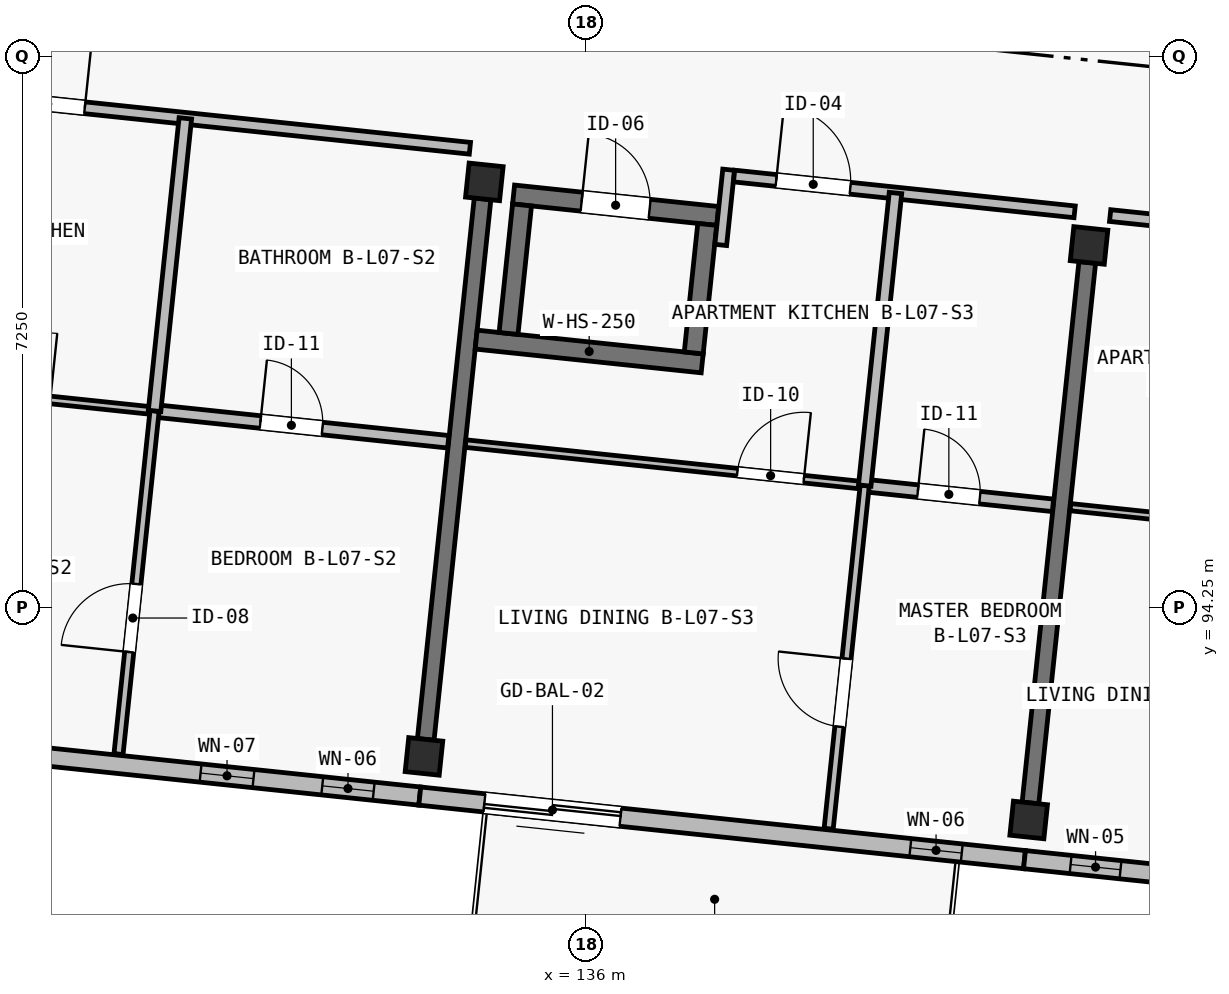
"""IFC4 building model, lengths in metres.
Left out: names, types, materials, properties, quantities, classifications, styles, units other than length and angle.
Written with IfcOpenShell. Run it as: python <this file> out.ifc"""

import sys

from ifc_helpers import new_model, si_unit, direction, frame, frame_2d, origin, origin_2d, place, context, subcontext, project, spatial, rectangle, extrude, element, fill, save


model = new_model("IFC4")
c1 = context("Model", 3, precision=1e-05, world=origin(), true_north=direction((0.0, 1.0)))
c2 = subcontext(c1, "Body", "Model", "MODEL_VIEW")
j1 = project(units=[si_unit("LENGTHUNIT", "METRE"), si_unit("PLANEANGLEUNIT", "RADIAN")], contexts=[c1])
p1 = place(None, origin())
s1 = spatial("IfcSite", under=j1, at=p1, CompositionType="ELEMENT")
p2 = place(p1, origin())
s2 = spatial("IfcBuilding", under=s1, at=p2, CompositionType="ELEMENT")
p3 = place(p2, frame((0.0, 0.0, 24.65)))
s3 = spatial("IfcBuildingStorey", under=s2, at=p3, CompositionType="ELEMENT", Elevation=24.65)
for number, where, z_axis, x_axis in (
    (1, (133.868, 92.291, 0.0), (0.0, 0.0, 1.0), (0.995, -0.105, 0.0)),
    (2, (134.663, 99.85, 0.0), (0.0, 0.0, 1.0), (0.995, -0.105, 0.0)),
    (3, (141.825, 91.455, 0.0), (0.0, 0.0, 1.0), (0.995, -0.105, 0.0)),
    (4, (142.619, 99.013, 0.0), (0.0, 0.0, 1.0), (0.995, -0.105, 0.0)),
):
    element("IfcColumn", number, at=place(p3, frame(where, z_axis=z_axis, x_axis=x_axis)), inside=s3, PredefinedType="COLUMN", context=c2, shape_type="SweptSolid", body=[
        extrude(rectangle(XDim=0.45, YDim=0.45, at=origin_2d()), origin(), (0.0, 0.0, 1.0), 3.25),
    ])
p4 = place(p3, frame((133.892, 92.515, 0.0), z_axis=(0.0, 0.0, 1.0), x_axis=(0.104519481265, 0.994522839374, 0.0)))
e5 = element("IfcWall", 5, at=p4, inside=s3, PredefinedType="SHEAR", context=c2, shape_type="SweptSolid", body=[
    extrude(rectangle(XDim=7.15, YDim=0.22, at=frame_2d((3.575, 0.0))), origin(), (0.0, 0.0, 1.0), 2.5),
])
p5 = place(p3, frame((141.848, 91.679, 0.0), z_axis=(0.0, 0.0, 1.0), x_axis=(0.104553253602, 0.994519289487, 0.0)))
e6 = element("IfcWall", 6, at=p5, inside=s3, PredefinedType="SHEAR", context=c2, shape_type="SweptSolid", body=[
    extrude(rectangle(XDim=7.15, YDim=0.22, at=frame_2d((3.575, 0.0))), origin(), (0.0, 0.0, 1.0), 2.5),
])
p6 = place(p3, frame((134.555, 97.775, 0.0), z_axis=(0.0, 0.0, 1.0), x_axis=(0.994514844427, -0.104595526741, 0.0)))
e7 = element("IfcWall", 7, at=p6, inside=s3, PredefinedType="SHEAR", context=c2, shape_type="SweptSolid", body=[
    extrude(rectangle(XDim=2.99, YDim=0.25, at=frame_2d((1.495, 0.0))), origin(), (0.0, 0.0, 1.0), 3.25),
])
p7 = place(p3, frame((135.048, 99.684, 0.0), z_axis=(0.0, 0.0, 1.0), x_axis=(0.994522285292, -0.104524753323, 0.0)))
e8 = element("IfcWall", 8, at=p7, inside=s3, PredefinedType="SHEAR", context=c2, shape_type="SweptSolid", body=[
    extrude(rectangle(XDim=2.7, YDim=0.25, at=frame_2d((1.35, 0.0))), origin(), (0.0, 0.0, 1.0), 3.25),
])
p8 = place(p7, frame((0.9, 0.0, 0.0)))
e9 = element("IfcOpeningElement", 9, at=p8, cuts=e8, PredefinedType="OPENING", context=c2, shape_type="SweptSolid", body=[
    extrude(rectangle(XDim=0.9, YDim=2.05, at=frame_2d((0.45, 1.025))), frame((0.0, 0.14, 0.0), z_axis=(0.0, -1.0, 0.0), x_axis=(1.0, 0.0, 0.0)), (0.0, 0.0, 1.0), 0.28),
])
for number, where, z_axis, x_axis in (
    (10, (134.981, 97.855, 0.0), (0.0, 0.0, 1.0), (0.105, 0.995, 0.0)),
    (11, (137.418, 97.599, 0.0), (0.0, 0.0, 1.0), (0.105, 0.995, 0.0)),
):
    element("IfcWall", number, at=place(p3, frame(where, z_axis=z_axis, x_axis=x_axis)), inside=s3, PredefinedType="SHEAR", context=c2, shape_type="SweptSolid", body=[
        extrude(rectangle(XDim=1.7, YDim=0.25, at=frame_2d((0.85, 0.0))), origin(), (0.0, 0.0, 1.0), 3.25),
    ])
p9 = place(p3, frame((133.814, 91.769, 0.0), z_axis=(0.0, 0.0, 1.0), x_axis=(-0.994522662826, 0.104521161134, 0.0)))
e12 = element("IfcWall", 12, at=p9, inside=s3, PredefinedType="SOLIDWALL", context=c2, shape_type="SweptSolid", body=[
    extrude(rectangle(XDim=8.0, YDim=0.24, at=frame_2d((4.0, 0.0))), origin(), (0.0, 0.0, 1.0), 3.0),
])
p10 = place(p9, frame((0.61, 0.0, 0.42)))
e13 = element("IfcOpeningElement", 13, at=p10, cuts=e12, PredefinedType="OPENING", context=c2, shape_type="SweptSolid", body=[
    extrude(rectangle(XDim=0.68, YDim=2.24, at=frame_2d((0.34, 1.12))), frame((0.0, 0.135, 0.0), z_axis=(0.0, -1.0, 0.0), x_axis=(1.0, 0.0, 0.0)), (0.0, 0.0, 1.0), 0.27),
])
p11 = place(p9, frame((2.2, 0.0, 0.48)))
e14 = element("IfcOpeningElement", 14, at=p11, cuts=e12, PredefinedType="OPENING", context=c2, shape_type="SweptSolid", body=[
    extrude(rectangle(XDim=0.7, YDim=2.36, at=frame_2d((0.35, 1.18))), frame((0.0, 0.135, 0.0), z_axis=(0.0, -1.0, 0.0), x_axis=(1.0, 0.0, 0.0)), (0.0, 0.0, 1.0), 0.27),
])
p12 = place(p9, frame((5.341, 0.0, 0.42)))
e15 = element("IfcOpeningElement", 15, at=p12, cuts=e12, PredefinedType="OPENING", context=c2, shape_type="SweptSolid", body=[
    extrude(rectangle(XDim=0.74, YDim=2.26, at=frame_2d((0.37, 1.13))), frame((0.0, 0.135, 0.0), z_axis=(0.0, -1.0, 0.0), x_axis=(1.0, 0.0, 0.0)), (0.0, 0.0, 1.0), 0.27),
])
p13 = place(p3, frame((141.77, 90.933, 0.0), z_axis=(0.0, 0.0, 1.0), x_axis=(-0.994519156568, 0.104554517933, 0.0)))
e16 = element("IfcWall", 16, at=p13, inside=s3, PredefinedType="SOLIDWALL", context=c2, shape_type="SweptSolid", body=[
    extrude(rectangle(XDim=8.0, YDim=0.24, at=frame_2d((4.0, 0.0))), origin(), (0.0, 0.0, 1.0), 3.0),
])
p14 = place(p13, frame((5.345, 0.0, 0.0)))
e17 = element("IfcOpeningElement", 17, at=p14, cuts=e16, PredefinedType="OPENING", context=c2, shape_type="SweptSolid", body=[
    extrude(rectangle(XDim=1.8, YDim=2.12, at=frame_2d((0.9, 1.06))), frame((0.0, 0.135, 0.0), z_axis=(0.0, -1.0, 0.0), x_axis=(1.0, 0.0, 0.0)), (0.0, 0.0, 1.0), 0.27),
])
p15 = place(p13, frame((0.83, 0.0, 0.46)))
e18 = element("IfcOpeningElement", 18, at=p15, cuts=e16, PredefinedType="OPENING", context=c2, shape_type="SweptSolid", body=[
    extrude(rectangle(XDim=0.68, YDim=2.24, at=frame_2d((0.34, 1.12))), frame((0.0, 0.135, 0.0), z_axis=(0.0, -1.0, 0.0), x_axis=(1.0, 0.0, 0.0)), (0.0, 0.0, 1.0), 0.27),
])
p16 = place(p3, frame((149.726, 90.097, 0.0), z_axis=(0.0, 0.0, 1.0), x_axis=(-0.994522662826, 0.104521161134, 0.0)))
e19 = element("IfcWall", 19, at=p16, inside=s3, PredefinedType="SOLIDWALL", context=c2, shape_type="SweptSolid", body=[
    extrude(rectangle(XDim=8.0, YDim=0.24, at=frame_2d((4.0, 0.0))), origin(), (0.0, 0.0, 1.0), 3.0),
])
p17 = place(p16, frame((1.319, 0.0, 0.52)))
e20 = element("IfcOpeningElement", 20, at=p17, cuts=e19, PredefinedType="OPENING", context=c2, shape_type="SweptSolid", body=[
    extrude(rectangle(XDim=0.58, YDim=2.16, at=frame_2d((0.29, 1.08))), frame((0.0, 0.135, 0.0), z_axis=(0.0, -1.0, 0.0), x_axis=(1.0, 0.0, 0.0)), (0.0, 0.0, 1.0), 0.27),
])
p18 = place(p16, frame((5.1, 0.0, 0.52)))
e21 = element("IfcOpeningElement", 21, at=p18, cuts=e19, PredefinedType="OPENING", context=c2, shape_type="SweptSolid", body=[
    extrude(rectangle(XDim=0.64, YDim=2.18, at=frame_2d((0.32, 1.09))), frame((0.0, 0.135, 0.0), z_axis=(0.0, -1.0, 0.0), x_axis=(1.0, 0.0, 0.0)), (0.0, 0.0, 1.0), 0.27),
])
p19 = place(p16, frame((6.73, 0.0, 0.42)))
e22 = element("IfcOpeningElement", 22, at=p19, cuts=e19, PredefinedType="OPENING", context=c2, shape_type="SweptSolid", body=[
    extrude(rectangle(XDim=0.66, YDim=2.32, at=frame_2d((0.33, 1.16))), frame((0.0, 0.135, 0.0), z_axis=(0.0, -1.0, 0.0), x_axis=(1.0, 0.0, 0.0)), (0.0, 0.0, 1.0), 0.27),
])
p20 = place(p3, frame((126.984, 101.079, 0.0), z_axis=(0.0, 0.0, 1.0), x_axis=(0.994521785195, -0.104529511491, 0.0)))
e23 = element("IfcWall", 23, at=p20, inside=s3, PredefinedType="PARTITIONING", context=c2, shape_type="SweptSolid", body=[
    extrude(rectangle(XDim=7.53, YDim=0.155, at=frame_2d((3.765, 0.0))), origin(), (0.0, 0.0, 1.0), 2.97),
])
p21 = place(p20, frame((1.455, 0.0, 0.0)))
e24 = element("IfcOpeningElement", 24, at=p21, cuts=e23, PredefinedType="OPENING", context=c2, shape_type="SweptSolid", body=[
    extrude(rectangle(XDim=0.98, YDim=2.15, at=frame_2d((0.49, 1.075))), frame((0.0, 0.093, 0.0), z_axis=(0.0, -1.0, 0.0), x_axis=(1.0, 0.0, 0.0)), (0.0, 0.0, 1.0), 0.185),
])
p22 = place(p3, frame((126.46, 97.243, 0.0), z_axis=(0.0, 0.0, 1.0), x_axis=(0.994524375082, -0.104504867671, 0.0)))
e25 = element("IfcWall", 25, at=p22, inside=s3, PredefinedType="PARTITIONING", context=c2, shape_type="SweptSolid", body=[
    extrude(rectangle(XDim=3.885, YDim=0.1, at=frame_2d((1.942, 0.0))), origin(), (0.0, 0.0, 1.0), 2.97),
])
p23 = place(p22, frame((1.625, 0.0, 0.0)))
e26 = element("IfcOpeningElement", 26, at=p23, cuts=e25, PredefinedType="OPENING", context=c2, shape_type="SweptSolid", body=[
    extrude(rectangle(XDim=0.88, YDim=2.1, at=frame_2d((0.44, 1.05))), frame((0.0, 0.065, 0.0), z_axis=(0.0, -1.0, 0.0), x_axis=(1.0, 0.0, 0.0)), (0.0, 0.0, 1.0), 0.13),
])
p24 = place(p3, frame((130.324, 96.837, 0.0), z_axis=(0.0, 0.0, 1.0), x_axis=(0.994524375082, -0.104504867671, 0.0)))
e27 = element("IfcWall", 27, at=p24, inside=s3, PredefinedType="PLUMBINGWALL", context=c2, shape_type="SweptSolid", body=[
    extrude(rectangle(XDim=3.885, YDim=0.165, at=frame_2d((1.942, 0.0))), origin(), (0.0, 0.0, 1.0), 2.97),
])
p25 = place(p24, frame((1.4, 0.0, 0.0)))
e28 = element("IfcOpeningElement", 28, at=p25, cuts=e27, PredefinedType="OPENING", context=c2, shape_type="SweptSolid", body=[
    extrude(rectangle(XDim=0.82, YDim=2.08, at=frame_2d((0.41, 1.04))), frame((0.0, 0.097, 0.0), z_axis=(0.0, -1.0, 0.0), x_axis=(1.0, 0.0, 0.0)), (0.0, 0.0, 1.0), 0.195),
])
p26 = place(p3, frame((129.85, 92.322, 0.0), z_axis=(0.0, 0.0, 1.0), x_axis=(0.104539221709, 0.994520764552, 0.0)))
e29 = element("IfcWall", 29, at=p26, inside=s3, PredefinedType="PARTITIONING", context=c2, shape_type="SweptSolid", body=[
    extrude(rectangle(XDim=4.54, YDim=0.12, at=frame_2d((2.27, 0.0))), origin(), (0.0, 0.0, 1.0), 2.97),
])
p27 = place(p26, frame((1.35, 0.0, 0.0)))
e30 = element("IfcOpeningElement", 30, at=p27, cuts=e29, PredefinedType="OPENING", context=c2, shape_type="SweptSolid", body=[
    extrude(rectangle(XDim=0.9, YDim=2.1, at=frame_2d((0.45, 1.05))), frame((0.0, 0.075, 0.0), z_axis=(0.0, -1.0, 0.0), x_axis=(1.0, 0.0, 0.0)), (0.0, 0.0, 1.0), 0.15),
])
p28 = place(p3, frame((130.324, 96.837, 0.0), z_axis=(0.0, 0.0, 1.0), x_axis=(0.104530443122, 0.994521687275, 0.0)))
e31 = element("IfcWall", 31, at=p28, inside=s3, PredefinedType="PLUMBINGWALL", context=c2, shape_type="SweptSolid", body=[
    extrude(rectangle(XDim=3.87, YDim=0.165, at=frame_2d((1.935, 0.0))), origin(), (0.0, 0.0, 1.0), 2.97),
])
p29 = place(p3, frame((137.773, 99.02, 0.0), z_axis=(0.0, 0.0, 1.0), x_axis=(0.104531505358, 0.994521575627, 0.0)))
e32 = element("IfcWall", 32, at=p29, inside=s3, PredefinedType="PARTITIONING", context=c2, shape_type="SweptSolid", body=[
    extrude(rectangle(XDim=0.995, YDim=0.155, at=frame_2d((0.498, 0.0))), origin(), (0.0, 0.0, 1.0), 2.97),
])
p30 = place(p3, frame((137.949, 99.927, 0.0), z_axis=(0.0, 0.0, 1.0), x_axis=(0.994526220308, -0.104487306019, 0.0)))
e33 = element("IfcWall", 33, at=p30, inside=s3, PredefinedType="PARTITIONING", context=c2, shape_type="SweptSolid", body=[
    extrude(rectangle(XDim=4.505, YDim=0.155, at=frame_2d((2.252, 0.0))), origin(), (0.0, 0.0, 1.0), 2.97),
])
p31 = place(p30, frame((0.557, 0.0, 0.0)))
e34 = element("IfcOpeningElement", 34, at=p31, cuts=e33, PredefinedType="OPENING", context=c2, shape_type="SweptSolid", body=[
    extrude(rectangle(XDim=0.98, YDim=2.15, at=frame_2d((0.49, 1.075))), frame((0.0, 0.093, 0.0), z_axis=(0.0, -1.0, 0.0), x_axis=(1.0, 0.0, 0.0)), (0.0, 0.0, 1.0), 0.185),
])
p32 = place(p3, frame((134.417, 96.406, 0.0), z_axis=(0.0, 0.0, 1.0), x_axis=(0.994524692105, -0.104501850668, 0.0)))
e35 = element("IfcWall", 35, at=p32, inside=s3, PredefinedType="PARTITIONING", context=c2, shape_type="SweptSolid", body=[
    extrude(rectangle(XDim=5.28, YDim=0.1, at=frame_2d((2.64, 0.0))), origin(), (0.0, 0.0, 1.0), 2.97),
])
p33 = place(p32, frame((3.595, 0.0, 0.0)))
e36 = element("IfcOpeningElement", 36, at=p33, cuts=e35, PredefinedType="OPENING", context=c2, shape_type="SweptSolid", body=[
    extrude(rectangle(XDim=0.88, YDim=2.1, at=frame_2d((0.44, 1.05))), frame((0.0, 0.065, 0.0), z_axis=(0.0, -1.0, 0.0), x_axis=(1.0, 0.0, 0.0)), (0.0, 0.0, 1.0), 0.13),
])
p34 = place(p3, frame((139.668, 95.855, 0.0), z_axis=(0.0, 0.0, 1.0), x_axis=(0.994522631864, -0.10452145574, 0.0)))
e37 = element("IfcWall", 37, at=p34, inside=s3, PredefinedType="PLUMBINGWALL", context=c2, shape_type="SweptSolid", body=[
    extrude(rectangle(XDim=2.49, YDim=0.165, at=frame_2d((1.245, 0.0))), origin(), (0.0, 0.0, 1.0), 2.97),
])
p35 = place(p34, frame((0.703, 0.0, 0.0)))
e38 = element("IfcOpeningElement", 38, at=p35, cuts=e37, PredefinedType="OPENING", context=c2, shape_type="SweptSolid", body=[
    extrude(rectangle(XDim=0.82, YDim=2.08, at=frame_2d((0.41, 1.04))), frame((0.0, 0.097, 0.0), z_axis=(0.0, -1.0, 0.0), x_axis=(1.0, 0.0, 0.0)), (0.0, 0.0, 1.0), 0.195),
])
p36 = place(p3, frame((139.193, 91.34, 0.0), z_axis=(0.0, 0.0, 1.0), x_axis=(0.104539221709, 0.994520764552, 0.0)))
e39 = element("IfcWall", 39, at=p36, inside=s3, PredefinedType="PARTITIONING", context=c2, shape_type="SweptSolid", body=[
    extrude(rectangle(XDim=4.54, YDim=0.12, at=frame_2d((2.27, 0.0))), origin(), (0.0, 0.0, 1.0), 2.97),
])
p37 = place(p36, frame((1.35, 0.0, 0.0)))
e40 = element("IfcOpeningElement", 40, at=p37, cuts=e39, PredefinedType="OPENING", context=c2, shape_type="SweptSolid", body=[
    extrude(rectangle(XDim=0.9, YDim=2.1, at=frame_2d((0.45, 1.05))), frame((0.0, 0.075, 0.0), z_axis=(0.0, -1.0, 0.0), x_axis=(1.0, 0.0, 0.0)), (0.0, 0.0, 1.0), 0.15),
])
p38 = place(p3, frame((139.668, 95.855, 0.0), z_axis=(0.0, 0.0, 1.0), x_axis=(0.10453700162, 0.994520997914, 0.0)))
e41 = element("IfcWall", 41, at=p38, inside=s3, PredefinedType="PLUMBINGWALL", context=c2, shape_type="SweptSolid", body=[
    extrude(rectangle(XDim=3.87, YDim=0.165, at=frame_2d((1.935, 0.0))), origin(), (0.0, 0.0, 1.0), 2.97),
])
p39 = place(p3, frame((142.897, 99.406, 0.0), z_axis=(0.0, 0.0, 1.0), x_axis=(0.994521785195, -0.104529511491, 0.0)))
e42 = element("IfcWall", 42, at=p39, inside=s3, PredefinedType="PARTITIONING", context=c2, shape_type="SweptSolid", body=[
    extrude(rectangle(XDim=7.53, YDim=0.155, at=frame_2d((3.765, 0.0))), origin(), (0.0, 0.0, 1.0), 2.97),
])
p40 = place(p39, frame((1.455, 0.0, 0.0)))
e43 = element("IfcOpeningElement", 43, at=p40, cuts=e42, PredefinedType="OPENING", context=c2, shape_type="SweptSolid", body=[
    extrude(rectangle(XDim=1.02, YDim=2.2, at=frame_2d((0.51, 1.1))), frame((0.0, 0.093, 0.0), z_axis=(0.0, -1.0, 0.0), x_axis=(1.0, 0.0, 0.0)), (0.0, 0.0, 1.0), 0.185),
])
p41 = place(p3, frame((142.373, 95.57, 0.0), z_axis=(0.0, 0.0, 1.0), x_axis=(0.994524375082, -0.104504867671, 0.0)))
e44 = element("IfcWall", 44, at=p41, inside=s3, PredefinedType="PARTITIONING", context=c2, shape_type="SweptSolid", body=[
    extrude(rectangle(XDim=3.885, YDim=0.095, at=frame_2d((1.942, 0.0))), origin(), (0.0, 0.0, 1.0), 2.97),
])
p42 = place(p41, frame((1.625, 0.0, 0.0)))
e45 = element("IfcOpeningElement", 45, at=p42, cuts=e44, PredefinedType="OPENING", context=c2, shape_type="SweptSolid", body=[
    extrude(rectangle(XDim=0.9, YDim=2.1, at=frame_2d((0.45, 1.05))), frame((0.0, 0.062, 0.0), z_axis=(0.0, -1.0, 0.0), x_axis=(1.0, 0.0, 0.0)), (0.0, 0.0, 1.0), 0.125),
])
p43 = place(p10, origin())
e46 = element("IfcWindow", 46, at=p43, inside=s3, PartitioningType="SINGLE_PANEL", PredefinedType="WINDOW", context=c2, shape_type="SweptSolid", body=[
    extrude(rectangle(XDim=0.68, YDim=2.24, at=frame_2d((0.34, 1.12))), frame((0.0, 0.03, 0.0), z_axis=(0.0, -1.0, 0.0), x_axis=(1.0, 0.0, 0.0)), (0.0, 0.0, 1.0), 0.06),
])
fill(e13, e46)
p44 = place(p11, origin())
e47 = element("IfcWindow", 47, at=p44, inside=s3, PartitioningType="SINGLE_PANEL", PredefinedType="WINDOW", context=c2, shape_type="SweptSolid", body=[
    extrude(rectangle(XDim=0.7, YDim=2.36, at=frame_2d((0.35, 1.18))), frame((0.0, 0.03, 0.0), z_axis=(0.0, -1.0, 0.0), x_axis=(1.0, 0.0, 0.0)), (0.0, 0.0, 1.0), 0.06),
])
fill(e14, e47)
p45 = place(p14, origin())
e48 = element("IfcDoor", 48, at=p45, inside=s3, OperationType="SLIDING_TO_LEFT", PredefinedType="DOOR", context=c2, shape_type="SweptSolid", body=[
    extrude(rectangle(XDim=1.8, YDim=2.12, at=frame_2d((0.9, 1.06))), frame((0.0, 0.025, 0.0), z_axis=(0.0, -1.0, 0.0), x_axis=(1.0, 0.0, 0.0)), (0.0, 0.0, 1.0), 0.05),
])
fill(e17, e48)
p46 = place(p15, origin())
e49 = element("IfcWindow", 49, at=p46, inside=s3, PartitioningType="SINGLE_PANEL", PredefinedType="WINDOW", context=c2, shape_type="SweptSolid", body=[
    extrude(rectangle(XDim=0.68, YDim=2.24, at=frame_2d((0.34, 1.12))), frame((0.0, 0.03, 0.0), z_axis=(0.0, -1.0, 0.0), x_axis=(1.0, 0.0, 0.0)), (0.0, 0.0, 1.0), 0.06),
])
fill(e18, e49)
p47 = place(p19, origin())
e50 = element("IfcWindow", 50, at=p47, inside=s3, PartitioningType="SINGLE_PANEL", PredefinedType="WINDOW", context=c2, shape_type="SweptSolid", body=[
    extrude(rectangle(XDim=0.66, YDim=2.32, at=frame_2d((0.33, 1.16))), frame((0.0, 0.03, 0.0), z_axis=(0.0, -1.0, 0.0), x_axis=(1.0, 0.0, 0.0)), (0.0, 0.0, 1.0), 0.06),
])
fill(e22, e50)
p48 = place(p21, origin())
e51 = element("IfcDoor", 51, at=p48, inside=s3, OperationType="SINGLE_SWING_RIGHT", PredefinedType="DOOR", context=c2, shape_type="SweptSolid", body=[
    extrude(rectangle(XDim=0.98, YDim=2.15, at=frame_2d((0.49, 1.075))), frame((0.0, 0.025, 0.0), z_axis=(0.0, -1.0, 0.0), x_axis=(1.0, 0.0, 0.0)), (0.0, 0.0, 1.0), 0.05),
])
fill(e24, e51)
p49 = place(p25, origin())
e52 = element("IfcDoor", 52, at=p49, inside=s3, OperationType="SINGLE_SWING_LEFT", PredefinedType="DOOR", context=c2, shape_type="SweptSolid", body=[
    extrude(rectangle(XDim=0.82, YDim=2.08, at=frame_2d((0.41, 1.04))), frame((0.0, 0.025, 0.0), z_axis=(0.0, -1.0, 0.0), x_axis=(1.0, 0.0, 0.0)), (0.0, 0.0, 1.0), 0.05),
])
fill(e28, e52)
p50 = place(p27, origin())
e53 = element("IfcDoor", 53, at=p50, inside=s3, OperationType="SINGLE_SWING_LEFT", PredefinedType="DOOR", context=c2, shape_type="SweptSolid", body=[
    extrude(rectangle(XDim=0.9, YDim=2.1, at=frame_2d((0.45, 1.05))), frame((0.0, 0.025, 0.0), z_axis=(0.0, -1.0, 0.0), x_axis=(1.0, 0.0, 0.0)), (0.0, 0.0, 1.0), 0.05),
])
fill(e30, e53)
p51 = place(p31, origin())
e54 = element("IfcDoor", 54, at=p51, inside=s3, OperationType="SINGLE_SWING_LEFT", PredefinedType="DOOR", context=c2, shape_type="SweptSolid", body=[
    extrude(rectangle(XDim=0.98, YDim=2.15, at=frame_2d((0.49, 1.075))), frame((0.0, 0.025, 0.0), z_axis=(0.0, -1.0, 0.0), x_axis=(1.0, 0.0, 0.0)), (0.0, 0.0, 1.0), 0.05),
])
fill(e34, e54)
p52 = place(p33, origin())
e55 = element("IfcDoor", 55, at=p52, inside=s3, OperationType="SINGLE_SWING_RIGHT", PredefinedType="DOOR", context=c2, shape_type="SweptSolid", body=[
    extrude(rectangle(XDim=0.88, YDim=2.1, at=frame_2d((0.44, 1.05))), frame((0.0, 0.025, 0.0), z_axis=(0.0, -1.0, 0.0), x_axis=(1.0, 0.0, 0.0)), (0.0, 0.0, 1.0), 0.05),
])
fill(e36, e55)
p53 = place(p35, origin())
e56 = element("IfcDoor", 56, at=p53, inside=s3, OperationType="SINGLE_SWING_LEFT", PredefinedType="DOOR", context=c2, shape_type="SweptSolid", body=[
    extrude(rectangle(XDim=0.82, YDim=2.08, at=frame_2d((0.41, 1.04))), frame((0.0, 0.025, 0.0), z_axis=(0.0, -1.0, 0.0), x_axis=(1.0, 0.0, 0.0)), (0.0, 0.0, 1.0), 0.05),
])
fill(e38, e56)
p54 = place(p37, origin())
e57 = element("IfcDoor", 57, at=p54, inside=s3, OperationType="SINGLE_SWING_RIGHT", PredefinedType="DOOR", context=c2, shape_type="SweptSolid", body=[
    extrude(rectangle(XDim=0.9, YDim=2.1, at=frame_2d((0.45, 1.05))), frame((0.0, 0.025, 0.0), z_axis=(0.0, -1.0, 0.0), x_axis=(1.0, 0.0, 0.0)), (0.0, 0.0, 1.0), 0.05),
])
fill(e40, e57)
p55 = place(p8, origin())
e58 = element("IfcDoor", 58, at=p55, inside=s3, OperationType="SINGLE_SWING_LEFT", PredefinedType="DOOR", context=c2, shape_type="SweptSolid", body=[
    extrude(rectangle(XDim=0.9, YDim=2.05, at=frame_2d((0.45, 1.025))), frame((0.0, 0.025, 0.0), z_axis=(0.0, -1.0, 0.0), x_axis=(1.0, 0.0, 0.0)), (0.0, 0.0, 1.0), 0.05),
])
fill(e9, e58)
save(model, sys.argv[1])
